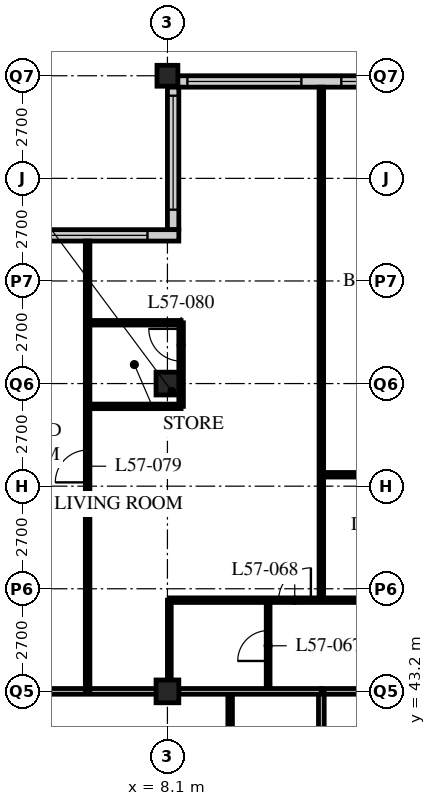
"""IFC4 building model, lengths in metres.
Left out: names, types, materials, properties, quantities, classifications, styles, units other than length and angle.
Written with IfcOpenShell. Run it as: python <this file> out.ifc"""

import sys

from ifc_helpers import new_model, si_unit, direction, frame, frame_2d, origin, origin_2d, place, context, subcontext, project, spatial, rectangle, hollow_rectangle, extrude, element, fill, save


model = new_model("IFC4")
c1 = context("Model", 3, precision=1e-05, world=origin(), true_north=direction((0.0, 1.0)))
c2 = subcontext(c1, "Body", "Model", "MODEL_VIEW")
j1 = project(units=[si_unit("LENGTHUNIT", "METRE"), si_unit("PLANEANGLEUNIT", "RADIAN")], contexts=[c1])
p1 = place(None, origin())
s1 = spatial("IfcSite", under=j1, at=p1, CompositionType="ELEMENT")
p2 = place(p1, origin())
s2 = spatial("IfcBuilding", under=s1, at=p2, CompositionType="ELEMENT")
p3 = place(p2, frame((0.0, 0.0, 220.8)))
s3 = spatial("IfcBuildingStorey", under=s2, at=p3, CompositionType="ELEMENT", Elevation=220.8)
for number, where, z_axis, x_axis in (
    (1, (8.1, 43.2, 0.0), (0.0, 0.0, 1.0), (1.0, 0.0, 0.0)),
    (2, (8.1, 51.3, 0.0), (0.0, 0.0, 1.0), (1.0, 0.0, 0.0)),
):
    element("IfcColumn", number, at=place(p3, frame(where, z_axis=z_axis, x_axis=x_axis)), inside=s3, PredefinedType="COLUMN", context=c2, shape_type="SweptSolid", body=[
        extrude(hollow_rectangle(XDim=0.6, YDim=0.6, WallThickness=0.05, at=origin_2d()), origin(), (0.0, 0.0, 1.0), 3.6),
    ])
p4 = place(p3, frame((8.1, 59.4, 0.0), z_axis=(0.0, 0.0, 1.0), x_axis=(1.0, 0.0, 0.0)))
e3 = element("IfcColumn", 3, at=p4, inside=s3, PredefinedType="COLUMN", context=c2, shape_type="SweptSolid", body=[
    extrude(hollow_rectangle(XDim=0.55, YDim=0.55, WallThickness=0.045, at=origin_2d()), origin(), (0.0, 0.0, 1.0), 3.6),
])
p5 = place(p3, frame((48.3, 59.25, 0.0), z_axis=(0.0, 0.0, 1.0), x_axis=(-1.0, 0.0, 0.0)))
e4 = element("IfcWall", 4, at=p5, inside=s3, PredefinedType="SOLIDWALL", context=c2, shape_type="SweptSolid", body=[
    extrude(rectangle(XDim=40.2, YDim=0.3, at=frame_2d((20.1, 0.0))), origin(), (0.0, 0.0, 1.0), 3.39),
])
p6 = place(p5, frame((0.225, 0.0, 0.6)))
e5 = element("IfcOpeningElement", 5, at=p6, cuts=e4, PredefinedType="OPENING", context=c2, shape_type="SweptSolid", body=[
    extrude(rectangle(XDim=3.0, YDim=2.0, at=frame_2d((1.5, 1.0))), frame((0.0, 0.16, 0.0), z_axis=(0.0, -1.0, 0.0), x_axis=(1.0, 0.0, 0.0)), (0.0, 0.0, 1.0), 0.32),
])
p7 = place(p5, frame((4.275, 0.0, 0.6)))
e6 = element("IfcOpeningElement", 6, at=p7, cuts=e4, PredefinedType="OPENING", context=c2, shape_type="SweptSolid", body=[
    extrude(rectangle(XDim=3.0, YDim=2.0, at=frame_2d((1.5, 1.0))), frame((0.0, 0.16, 0.0), z_axis=(0.0, -1.0, 0.0), x_axis=(1.0, 0.0, 0.0)), (0.0, 0.0, 1.0), 0.32),
])
p8 = place(p5, frame((8.325, 0.0, 0.6)))
e7 = element("IfcOpeningElement", 7, at=p8, cuts=e4, PredefinedType="OPENING", context=c2, shape_type="SweptSolid", body=[
    extrude(rectangle(XDim=3.0, YDim=2.0, at=frame_2d((1.5, 1.0))), frame((0.0, 0.16, 0.0), z_axis=(0.0, -1.0, 0.0), x_axis=(1.0, 0.0, 0.0)), (0.0, 0.0, 1.0), 0.32),
])
p9 = place(p5, frame((12.375, 0.0, 0.6)))
e8 = element("IfcOpeningElement", 8, at=p9, cuts=e4, PredefinedType="OPENING", context=c2, shape_type="SweptSolid", body=[
    extrude(rectangle(XDim=3.0, YDim=2.0, at=frame_2d((1.5, 1.0))), frame((0.0, 0.16, 0.0), z_axis=(0.0, -1.0, 0.0), x_axis=(1.0, 0.0, 0.0)), (0.0, 0.0, 1.0), 0.32),
])
p10 = place(p5, frame((16.425, 0.0, 0.6)))
e9 = element("IfcOpeningElement", 9, at=p10, cuts=e4, PredefinedType="OPENING", context=c2, shape_type="SweptSolid", body=[
    extrude(rectangle(XDim=3.0, YDim=2.0, at=frame_2d((1.5, 1.0))), frame((0.0, 0.16, 0.0), z_axis=(0.0, -1.0, 0.0), x_axis=(1.0, 0.0, 0.0)), (0.0, 0.0, 1.0), 0.32),
])
p11 = place(p5, frame((20.475, 0.0, 0.6)))
e10 = element("IfcOpeningElement", 10, at=p11, cuts=e4, PredefinedType="OPENING", context=c2, shape_type="SweptSolid", body=[
    extrude(rectangle(XDim=3.0, YDim=2.0, at=frame_2d((1.5, 1.0))), frame((0.0, 0.16, 0.0), z_axis=(0.0, -1.0, 0.0), x_axis=(1.0, 0.0, 0.0)), (0.0, 0.0, 1.0), 0.32),
])
p12 = place(p5, frame((24.525, 0.0, 0.6)))
e11 = element("IfcOpeningElement", 11, at=p12, cuts=e4, PredefinedType="OPENING", context=c2, shape_type="SweptSolid", body=[
    extrude(rectangle(XDim=3.0, YDim=2.0, at=frame_2d((1.5, 1.0))), frame((0.0, 0.16, 0.0), z_axis=(0.0, -1.0, 0.0), x_axis=(1.0, 0.0, 0.0)), (0.0, 0.0, 1.0), 0.32),
])
p13 = place(p5, frame((28.575, 0.0, 0.6)))
e12 = element("IfcOpeningElement", 12, at=p13, cuts=e4, PredefinedType="OPENING", context=c2, shape_type="SweptSolid", body=[
    extrude(rectangle(XDim=3.0, YDim=2.0, at=frame_2d((1.5, 1.0))), frame((0.0, 0.16, 0.0), z_axis=(0.0, -1.0, 0.0), x_axis=(1.0, 0.0, 0.0)), (0.0, 0.0, 1.0), 0.32),
])
p14 = place(p5, frame((32.625, 0.0, 0.6)))
e13 = element("IfcOpeningElement", 13, at=p14, cuts=e4, PredefinedType="OPENING", context=c2, shape_type="SweptSolid", body=[
    extrude(rectangle(XDim=3.0, YDim=2.0, at=frame_2d((1.5, 1.0))), frame((0.0, 0.16, 0.0), z_axis=(0.0, -1.0, 0.0), x_axis=(1.0, 0.0, 0.0)), (0.0, 0.0, 1.0), 0.32),
])
p15 = place(p5, frame((36.675, 0.0, 0.6)))
e14 = element("IfcOpeningElement", 14, at=p15, cuts=e4, PredefinedType="OPENING", context=c2, shape_type="SweptSolid", body=[
    extrude(rectangle(XDim=3.0, YDim=2.0, at=frame_2d((1.5, 1.0))), frame((0.0, 0.16, 0.0), z_axis=(0.0, -1.0, 0.0), x_axis=(1.0, 0.0, 0.0)), (0.0, 0.0, 1.0), 0.32),
])
p16 = place(p3, frame((8.25, 59.1, 0.0), z_axis=(0.0, 0.0, 1.0), x_axis=(0.0, -1.0, 0.0)))
e15 = element("IfcWall", 15, at=p16, inside=s3, PredefinedType="SOLIDWALL", context=c2, shape_type="SweptSolid", body=[
    extrude(rectangle(XDim=3.75, YDim=0.3, at=frame_2d((1.875, 0.0))), origin(), (0.0, 0.0, 1.0), 3.39),
])
p17 = place(p16, frame((0.225, 0.0, 0.6)))
e16 = element("IfcOpeningElement", 16, at=p17, cuts=e15, PredefinedType="OPENING", context=c2, shape_type="SweptSolid", body=[
    extrude(rectangle(XDim=3.0, YDim=2.0, at=frame_2d((1.5, 1.0))), frame((0.0, 0.16, 0.0), z_axis=(0.0, -1.0, 0.0), x_axis=(1.0, 0.0, 0.0)), (0.0, 0.0, 1.0), 0.32),
])
p18 = place(p3, frame((8.4, 55.2, 0.0), z_axis=(0.0, 0.0, 1.0), x_axis=(-1.0, 0.0, 0.0)))
e17 = element("IfcWall", 17, at=p18, inside=s3, PredefinedType="SOLIDWALL", context=c2, shape_type="SweptSolid", body=[
    extrude(rectangle(XDim=4.35, YDim=0.3, at=frame_2d((2.175, 0.0))), origin(), (0.0, 0.0, 1.0), 3.39),
])
p19 = place(p18, frame((0.825, 0.0, 0.6)))
e18 = element("IfcOpeningElement", 18, at=p19, cuts=e17, PredefinedType="OPENING", context=c2, shape_type="SweptSolid", body=[
    extrude(rectangle(XDim=3.0, YDim=2.0, at=frame_2d((1.5, 1.0))), frame((0.0, 0.16, 0.0), z_axis=(0.0, -1.0, 0.0), x_axis=(1.0, 0.0, 0.0)), (0.0, 0.0, 1.0), 0.32),
])
p20 = place(p3, frame((12.15, 43.2, 0.0), z_axis=(0.0, 0.0, 1.0), x_axis=(1.0, 0.0, 0.0)))
e19 = element("IfcWall", 19, at=p20, inside=s3, PredefinedType="PARTITIONING", context=c2, shape_type="SweptSolid", body=[
    extrude(rectangle(XDim=36.45, YDim=0.15, at=frame_2d((18.225, 0.0))), origin(), (0.0, 0.0, 1.0), 2.628),
])
p21 = place(p20, frame((4.95, 0.0, 0.0)))
e20 = element("IfcOpeningElement", 20, at=p21, cuts=e19, PredefinedType="OPENING", context=c2, shape_type="SweptSolid", body=[
    extrude(rectangle(XDim=1.0, YDim=2.1, at=frame_2d((0.5, 1.05))), frame((0.0, 0.085, 0.0), z_axis=(0.0, -1.0, 0.0), x_axis=(1.0, 0.0, 0.0)), (0.0, 0.0, 1.0), 0.17),
])
p22 = place(p20, frame((25.0, 0.0, 0.0)))
e21 = element("IfcOpeningElement", 21, at=p22, cuts=e19, PredefinedType="OPENING", context=c2, shape_type="SweptSolid", body=[
    extrude(rectangle(XDim=1.0, YDim=2.1, at=frame_2d((0.5, 1.05))), frame((0.0, 0.085, 0.0), z_axis=(0.0, -1.0, 0.0), x_axis=(1.0, 0.0, 0.0)), (0.0, 0.0, 1.0), 0.17),
])
p23 = place(p20, frame((30.7, 0.0, 0.0)))
e22 = element("IfcOpeningElement", 22, at=p23, cuts=e19, PredefinedType="OPENING", context=c2, shape_type="SweptSolid", body=[
    extrude(rectangle(XDim=1.0, YDim=2.1, at=frame_2d((0.5, 1.05))), frame((0.0, 0.085, 0.0), z_axis=(0.0, -1.0, 0.0), x_axis=(1.0, 0.0, 0.0)), (0.0, 0.0, 1.0), 0.17),
])
p24 = place(p20, frame((33.925, 0.0, 0.0)))
e23 = element("IfcOpeningElement", 23, at=p24, cuts=e19, PredefinedType="OPENING", context=c2, shape_type="SweptSolid", body=[
    extrude(rectangle(XDim=1.0, YDim=2.1, at=frame_2d((0.5, 1.05))), frame((0.0, 0.085, 0.0), z_axis=(0.0, -1.0, 0.0), x_axis=(1.0, 0.0, 0.0)), (0.0, 0.0, 1.0), 0.17),
])
p25 = place(p20, frame((1.525, 0.0, 0.0)))
e24 = element("IfcOpeningElement", 24, at=p25, cuts=e19, PredefinedType="OPENING", context=c2, shape_type="SweptSolid", body=[
    extrude(rectangle(XDim=1.0, YDim=2.1, at=frame_2d((0.5, 1.05))), frame((0.0, 0.085, 0.0), z_axis=(0.0, -1.0, 0.0), x_axis=(1.0, 0.0, 0.0)), (0.0, 0.0, 1.0), 0.17),
])
p26 = place(p3, frame((12.15, 18.9, 0.0), z_axis=(0.0, 0.0, 1.0), x_axis=(0.0, 1.0, 0.0)))
e25 = element("IfcWall", 25, at=p26, inside=s3, PredefinedType="PARTITIONING", context=c2, shape_type="SweptSolid", body=[
    extrude(rectangle(XDim=24.3, YDim=0.15, at=frame_2d((12.15, 0.0))), origin(), (0.0, 0.0, 1.0), 3.39),
])
p27 = place(p26, frame((0.4, 0.0, 0.0)))
e26 = element("IfcOpeningElement", 26, at=p27, cuts=e25, PredefinedType="OPENING", context=c2, shape_type="SweptSolid", body=[
    extrude(rectangle(XDim=1.0, YDim=2.1, at=frame_2d((0.5, 1.05))), frame((0.0, 0.085, 0.0), z_axis=(0.0, -1.0, 0.0), x_axis=(1.0, 0.0, 0.0)), (0.0, 0.0, 1.0), 0.17),
])
p28 = place(p26, frame((16.6, 0.0, 0.0)))
e27 = element("IfcOpeningElement", 27, at=p28, cuts=e25, PredefinedType="OPENING", context=c2, shape_type="SweptSolid", body=[
    extrude(rectangle(XDim=1.0, YDim=2.1, at=frame_2d((0.5, 1.05))), frame((0.0, 0.085, 0.0), z_axis=(0.0, -1.0, 0.0), x_axis=(1.0, 0.0, 0.0)), (0.0, 0.0, 1.0), 0.17),
])
p29 = place(p3, frame((9.75, 18.9, 0.0), z_axis=(0.0, 0.0, 1.0), x_axis=(0.0, 1.0, 0.0)))
e28 = element("IfcWall", 28, at=p29, inside=s3, PredefinedType="PARTITIONING", context=c2, shape_type="SweptSolid", body=[
    extrude(rectangle(XDim=24.3, YDim=0.12, at=frame_2d((12.15, 0.0))), origin(), (0.0, 0.0, 1.0), 3.39),
])
p30 = place(p29, frame((0.975, 0.0, 0.0)))
e29 = element("IfcOpeningElement", 29, at=p30, cuts=e28, PredefinedType="OPENING", context=c2, shape_type="SweptSolid", body=[
    extrude(rectangle(XDim=0.85, YDim=2.1, at=frame_2d((0.425, 1.05))), frame((0.0, 0.07, 0.0), z_axis=(0.0, -1.0, 0.0), x_axis=(1.0, 0.0, 0.0)), (0.0, 0.0, 1.0), 0.14),
])
p31 = place(p29, frame((8.425, 0.0, 0.0)))
e30 = element("IfcOpeningElement", 30, at=p31, cuts=e28, PredefinedType="OPENING", context=c2, shape_type="SweptSolid", body=[
    extrude(rectangle(XDim=0.85, YDim=2.1, at=frame_2d((0.425, 1.05))), frame((0.0, 0.07, 0.0), z_axis=(0.0, -1.0, 0.0), x_axis=(1.0, 0.0, 0.0)), (0.0, 0.0, 1.0), 0.14),
])
p32 = place(p29, frame((12.475, 0.0, 0.0)))
e31 = element("IfcOpeningElement", 31, at=p32, cuts=e28, PredefinedType="OPENING", context=c2, shape_type="SweptSolid", body=[
    extrude(rectangle(XDim=0.85, YDim=2.1, at=frame_2d((0.425, 1.05))), frame((0.0, 0.07, 0.0), z_axis=(0.0, -1.0, 0.0), x_axis=(1.0, 0.0, 0.0)), (0.0, 0.0, 1.0), 0.14),
])
p33 = place(p29, frame((17.175, 0.0, 0.0)))
e32 = element("IfcOpeningElement", 32, at=p33, cuts=e28, PredefinedType="OPENING", context=c2, shape_type="SweptSolid", body=[
    extrude(rectangle(XDim=0.85, YDim=2.1, at=frame_2d((0.425, 1.05))), frame((0.0, 0.07, 0.0), z_axis=(0.0, -1.0, 0.0), x_axis=(1.0, 0.0, 0.0)), (0.0, 0.0, 1.0), 0.14),
])
p34 = place(p29, frame((20.575, 0.0, 0.0)))
e33 = element("IfcOpeningElement", 33, at=p34, cuts=e28, PredefinedType="OPENING", context=c2, shape_type="SweptSolid", body=[
    extrude(rectangle(XDim=0.85, YDim=2.1, at=frame_2d((0.425, 1.05))), frame((0.0, 0.07, 0.0), z_axis=(0.0, -1.0, 0.0), x_axis=(1.0, 0.0, 0.0)), (0.0, 0.0, 1.0), 0.14),
])
p35 = place(p3, frame((10.75, 43.2, 0.0), z_axis=(0.0, 0.0, 1.0), x_axis=(0.0, 1.0, 0.0)))
e34 = element("IfcWall", 34, at=p35, inside=s3, PredefinedType="PARTITIONING", context=c2, shape_type="SweptSolid", body=[
    extrude(rectangle(XDim=2.4, YDim=0.1, at=frame_2d((1.2, 0.0))), origin(), (0.0, 0.0, 1.0), 3.39),
])
p36 = place(p35, frame((0.8, 0.0, 0.0)))
e35 = element("IfcOpeningElement", 35, at=p36, cuts=e34, PredefinedType="OPENING", context=c2, shape_type="SweptSolid", body=[
    extrude(rectangle(XDim=0.8, YDim=2.1, at=frame_2d((0.4, 1.05))), frame((0.0, 0.06, 0.0), z_axis=(0.0, -1.0, 0.0), x_axis=(1.0, 0.0, 0.0)), (0.0, 0.0, 1.0), 0.12),
])
p37 = place(p3, frame((8.15, 43.2, 0.0), z_axis=(0.0, 0.0, 1.0), x_axis=(0.0, 1.0, 0.0)))
e36 = element("IfcWall", 36, at=p37, inside=s3, PredefinedType="PARTITIONING", context=c2, shape_type="SweptSolid", body=[
    extrude(rectangle(XDim=2.4, YDim=0.1, at=frame_2d((1.2, 0.0))), origin(), (0.0, 0.0, 1.0), 2.628),
])
p38 = place(p3, frame((8.15, 45.6, 0.0), z_axis=(0.0, 0.0, 1.0), x_axis=(1.0, 0.0, 0.0)))
e37 = element("IfcWall", 37, at=p38, inside=s3, PredefinedType="PARTITIONING", context=c2, shape_type="SweptSolid", body=[
    extrude(rectangle(XDim=28.3, YDim=0.12, at=frame_2d((14.15, 0.0))), origin(), (0.0, 0.0, 1.0), 3.39),
])
p39 = place(p38, frame((9.025, 0.0, 0.0)))
e38 = element("IfcOpeningElement", 38, at=p39, cuts=e37, PredefinedType="OPENING", context=c2, shape_type="SweptSolid", body=[
    extrude(rectangle(XDim=0.85, YDim=2.1, at=frame_2d((0.425, 1.05))), frame((0.0, 0.07, 0.0), z_axis=(0.0, -1.0, 0.0), x_axis=(1.0, 0.0, 0.0)), (0.0, 0.0, 1.0), 0.14),
])
p40 = place(p38, frame((16.475, 0.0, 0.0)))
e39 = element("IfcOpeningElement", 39, at=p40, cuts=e37, PredefinedType="OPENING", context=c2, shape_type="SweptSolid", body=[
    extrude(rectangle(XDim=0.85, YDim=2.1, at=frame_2d((0.425, 1.05))), frame((0.0, 0.07, 0.0), z_axis=(0.0, -1.0, 0.0), x_axis=(1.0, 0.0, 0.0)), (0.0, 0.0, 1.0), 0.14),
])
p41 = place(p38, frame((20.525, 0.0, 0.0)))
e40 = element("IfcOpeningElement", 40, at=p41, cuts=e37, PredefinedType="OPENING", context=c2, shape_type="SweptSolid", body=[
    extrude(rectangle(XDim=0.85, YDim=2.1, at=frame_2d((0.425, 1.05))), frame((0.0, 0.07, 0.0), z_axis=(0.0, -1.0, 0.0), x_axis=(1.0, 0.0, 0.0)), (0.0, 0.0, 1.0), 0.14),
])
p42 = place(p38, frame((24.575, 0.0, 0.0)))
e41 = element("IfcOpeningElement", 41, at=p42, cuts=e37, PredefinedType="OPENING", context=c2, shape_type="SweptSolid", body=[
    extrude(rectangle(XDim=0.85, YDim=2.1, at=frame_2d((0.425, 1.05))), frame((0.0, 0.07, 0.0), z_axis=(0.0, -1.0, 0.0), x_axis=(1.0, 0.0, 0.0)), (0.0, 0.0, 1.0), 0.14),
])
p43 = place(p38, frame((6.725, 0.0, 0.0)))
e42 = element("IfcOpeningElement", 42, at=p43, cuts=e37, PredefinedType="OPENING", context=c2, shape_type="SweptSolid", body=[
    extrude(rectangle(XDim=0.85, YDim=2.1, at=frame_2d((0.425, 1.05))), frame((0.0, 0.07, 0.0), z_axis=(0.0, -1.0, 0.0), x_axis=(1.0, 0.0, 0.0)), (0.0, 0.0, 1.0), 0.14),
])
p44 = place(p38, frame((2.875, 0.0, 0.0)))
e43 = element("IfcOpeningElement", 43, at=p44, cuts=e37, PredefinedType="OPENING", context=c2, shape_type="SweptSolid", body=[
    extrude(rectangle(XDim=0.85, YDim=2.1, at=frame_2d((0.425, 1.05))), frame((0.0, 0.07, 0.0), z_axis=(0.0, -1.0, 0.0), x_axis=(1.0, 0.0, 0.0)), (0.0, 0.0, 1.0), 0.14),
])
p45 = place(p3, frame((12.15, 45.6, 0.0), z_axis=(0.0, 0.0, 1.0), x_axis=(0.0, 1.0, 0.0)))
e44 = element("IfcWall", 44, at=p45, inside=s3, PredefinedType="PARTITIONING", context=c2, shape_type="SweptSolid", body=[
    extrude(rectangle(XDim=13.5, YDim=0.12, at=frame_2d((6.75, 0.0))), origin(), (0.0, 0.0, 1.0), 3.39),
])
p46 = place(p3, frame((0.3, 43.2, 0.0), z_axis=(0.0, 0.0, 1.0), x_axis=(1.0, 0.0, 0.0)))
e45 = element("IfcWall", 45, at=p46, inside=s3, PredefinedType="PARTITIONING", context=c2, shape_type="SweptSolid", body=[
    extrude(rectangle(XDim=11.85, YDim=0.15, at=frame_2d((5.925, 0.0))), origin(), (0.0, 0.0, 1.0), 2.628),
])
p47 = place(p3, frame((12.15, 48.9, 0.0), z_axis=(0.0, 0.0, 1.0), x_axis=(1.0, 0.0, 0.0)))
e46 = element("IfcWall", 46, at=p47, inside=s3, PredefinedType="PARTITIONING", context=c2, shape_type="SweptSolid", body=[
    extrude(rectangle(XDim=4.05, YDim=0.12, at=frame_2d((2.025, 0.0))), origin(), (0.0, 0.0, 1.0), 3.39),
])
p48 = place(p47, frame((1.6, 0.0, 0.0)))
e47 = element("IfcOpeningElement", 47, at=p48, cuts=e46, PredefinedType="OPENING", context=c2, shape_type="SweptSolid", body=[
    extrude(rectangle(XDim=0.85, YDim=2.1, at=frame_2d((0.425, 1.05))), frame((0.0, 0.07, 0.0), z_axis=(0.0, -1.0, 0.0), x_axis=(1.0, 0.0, 0.0)), (0.0, 0.0, 1.0), 0.14),
])
p49 = place(p3, frame((6.0, 43.2, 0.0), z_axis=(0.0, 0.0, 1.0), x_axis=(0.0, 1.0, 0.0)))
e48 = element("IfcWall", 48, at=p49, inside=s3, PredefinedType="PARTITIONING", context=c2, shape_type="SweptSolid", body=[
    extrude(rectangle(XDim=11.85, YDim=0.12, at=frame_2d((5.925, 0.0))), origin(), (0.0, 0.0, 1.0), 3.39),
])
p50 = place(p49, frame((5.5, 0.0, 0.0)))
e49 = element("IfcOpeningElement", 49, at=p50, cuts=e48, PredefinedType="OPENING", context=c2, shape_type="SweptSolid", body=[
    extrude(rectangle(XDim=0.85, YDim=2.1, at=frame_2d((0.425, 1.05))), frame((0.0, 0.07, 0.0), z_axis=(0.0, -1.0, 0.0), x_axis=(1.0, 0.0, 0.0)), (0.0, 0.0, 1.0), 0.14),
])
for number, where, z_axis, x_axis in (
    (50, (6.0, 50.7, 0.0), (0.0, 0.0, 1.0), (1.0, 0.0, 0.0)),
    (51, (6.0, 52.9, 0.0), (0.0, 0.0, 1.0), (1.0, 0.0, 0.0)),
):
    element("IfcWall", number, at=place(p3, frame(where, z_axis=z_axis, x_axis=x_axis)), inside=s3, PredefinedType="PARTITIONING", context=c2, shape_type="SweptSolid", body=[
        extrude(rectangle(XDim=2.46, YDim=0.12, at=frame_2d((1.23, 0.0))), origin(), (0.0, 0.0, 1.0), 3.39),
    ])
p51 = place(p3, frame((8.46, 50.7, 0.0), z_axis=(0.0, 0.0, 1.0), x_axis=(0.0, 1.0, 0.0)))
e52 = element("IfcWall", 52, at=p51, inside=s3, PredefinedType="PARTITIONING", context=c2, shape_type="SweptSolid", body=[
    extrude(rectangle(XDim=2.2, YDim=0.12, at=frame_2d((1.1, 0.0))), origin(), (0.0, 0.0, 1.0), 3.39),
])
p52 = place(p51, frame((1.19, 0.0, 0.0)))
e53 = element("IfcOpeningElement", 53, at=p52, cuts=e52, PredefinedType="OPENING", context=c2, shape_type="SweptSolid", body=[
    extrude(rectangle(XDim=0.85, YDim=2.1, at=frame_2d((0.425, 1.05))), frame((0.0, 0.07, 0.0), z_axis=(0.0, -1.0, 0.0), x_axis=(1.0, 0.0, 0.0)), (0.0, 0.0, 1.0), 0.14),
])
p53 = place(p14, origin())
e54 = element("IfcWindow", 54, at=p53, inside=s3, PartitioningType="SINGLE_PANEL", PredefinedType="WINDOW", context=c2, shape_type="SweptSolid", body=[
    extrude(rectangle(XDim=3.0, YDim=2.0, at=frame_2d((1.5, 1.0))), frame((0.0, 0.03, 0.0), z_axis=(0.0, -1.0, 0.0), x_axis=(1.0, 0.0, 0.0)), (0.0, 0.0, 1.0), 0.06),
])
fill(e13, e54)
p54 = place(p15, origin())
e55 = element("IfcWindow", 55, at=p54, inside=s3, PartitioningType="SINGLE_PANEL", PredefinedType="WINDOW", context=c2, shape_type="SweptSolid", body=[
    extrude(rectangle(XDim=3.0, YDim=2.0, at=frame_2d((1.5, 1.0))), frame((0.0, 0.03, 0.0), z_axis=(0.0, -1.0, 0.0), x_axis=(1.0, 0.0, 0.0)), (0.0, 0.0, 1.0), 0.06),
])
fill(e14, e55)
p55 = place(p17, origin())
e56 = element("IfcWindow", 56, at=p55, inside=s3, PartitioningType="SINGLE_PANEL", PredefinedType="WINDOW", context=c2, shape_type="SweptSolid", body=[
    extrude(rectangle(XDim=3.0, YDim=2.0, at=frame_2d((1.5, 1.0))), frame((0.0, 0.03, 0.0), z_axis=(0.0, -1.0, 0.0), x_axis=(1.0, 0.0, 0.0)), (0.0, 0.0, 1.0), 0.06),
])
fill(e16, e56)
p56 = place(p19, origin())
e57 = element("IfcWindow", 57, at=p56, inside=s3, PartitioningType="SINGLE_PANEL", PredefinedType="WINDOW", context=c2, shape_type="SweptSolid", body=[
    extrude(rectangle(XDim=3.0, YDim=2.0, at=frame_2d((1.5, 1.0))), frame((0.0, 0.03, 0.0), z_axis=(0.0, -1.0, 0.0), x_axis=(1.0, 0.0, 0.0)), (0.0, 0.0, 1.0), 0.06),
])
fill(e18, e57)
p57 = place(p36, origin())
e58 = element("IfcDoor", 58, at=p57, inside=s3, OperationType="SINGLE_SWING_LEFT", PredefinedType="DOOR", context=c2, shape_type="SweptSolid", body=[
    extrude(rectangle(XDim=0.8, YDim=2.1, at=frame_2d((0.4, 1.05))), frame((0.0, 0.025, 0.0), z_axis=(0.0, -1.0, 0.0), x_axis=(1.0, 0.0, 0.0)), (0.0, 0.0, 1.0), 0.05),
])
fill(e35, e58)
p58 = place(p44, origin())
e59 = element("IfcDoor", 59, at=p58, inside=s3, OperationType="SINGLE_SWING_RIGHT", PredefinedType="DOOR", context=c2, shape_type="SweptSolid", body=[
    extrude(rectangle(XDim=0.85, YDim=2.1, at=frame_2d((0.425, 1.05))), frame((0.0, 0.025, 0.0), z_axis=(0.0, -1.0, 0.0), x_axis=(1.0, 0.0, 0.0)), (0.0, 0.0, 1.0), 0.05),
])
fill(e43, e59)
p59 = place(p50, origin())
e60 = element("IfcDoor", 60, at=p59, inside=s3, OperationType="SINGLE_SWING_LEFT", PredefinedType="DOOR", context=c2, shape_type="SweptSolid", body=[
    extrude(rectangle(XDim=0.85, YDim=2.1, at=frame_2d((0.425, 1.05))), frame((0.0, 0.025, 0.0), z_axis=(0.0, -1.0, 0.0), x_axis=(1.0, 0.0, 0.0)), (0.0, 0.0, 1.0), 0.05),
])
fill(e49, e60)
p60 = place(p52, origin())
e61 = element("IfcDoor", 61, at=p60, inside=s3, OperationType="SINGLE_SWING_RIGHT", PredefinedType="DOOR", context=c2, shape_type="SweptSolid", body=[
    extrude(rectangle(XDim=0.85, YDim=2.1, at=frame_2d((0.425, 1.05))), frame((0.0, 0.025, 0.0), z_axis=(0.0, -1.0, 0.0), x_axis=(1.0, 0.0, 0.0)), (0.0, 0.0, 1.0), 0.05),
])
fill(e53, e61)
save(model, sys.argv[1])
